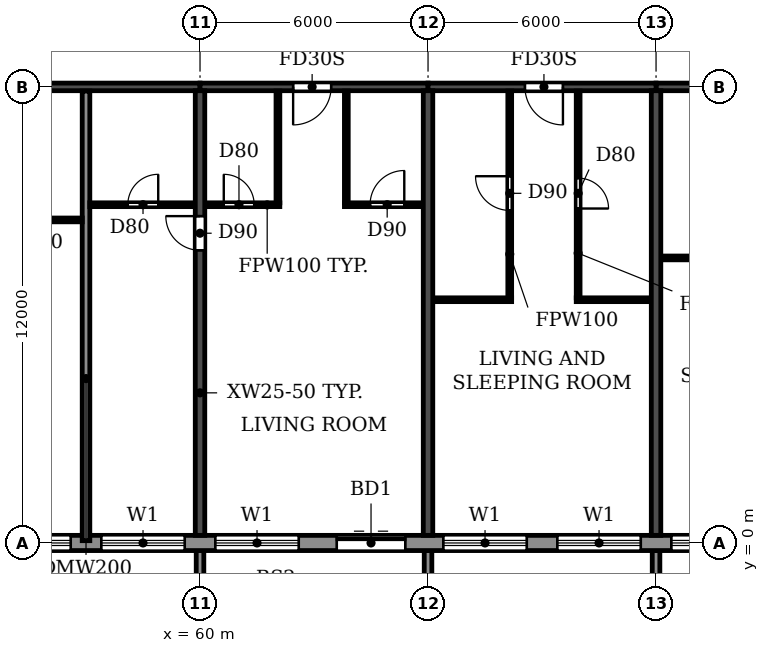
"""IFC4 building model, lengths in metres.
Left out: names, types, materials, properties, quantities, classifications, styles, units other than length and angle.
Written with IfcOpenShell. Run it as: python <this file> out.ifc"""

import sys

from ifc_helpers import new_model, si_unit, direction, frame, frame_2d, origin, place, context, subcontext, project, spatial, polyline, rectangle, outline, extrude, source, transform, mapped, element, fill, save


model = new_model("IFC4")
c1 = context("Model", 3, precision=1e-05, world=origin(), true_north=direction((0.0, 1.0)))
c2 = subcontext(c1, "Body", "Model", "MODEL_VIEW")
j1 = project(units=[si_unit("LENGTHUNIT", "METRE"), si_unit("PLANEANGLEUNIT", "RADIAN")], contexts=[c1])
p1 = place(None, origin())
s1 = spatial("IfcSite", under=j1, at=p1, CompositionType="ELEMENT")
p2 = place(p1, origin())
s2 = spatial("IfcBuilding", under=s1, at=p2, CompositionType="ELEMENT")
p3 = place(p2, frame((0.0, 0.0, 175.2)))
s3 = spatial("IfcBuildingStorey", under=s2, at=p3, CompositionType="ELEMENT", Elevation=175.2)
p4 = place(p3, frame((60.0, 0.2, 0.0), z_axis=(0.0, 0.0, 1.0), x_axis=(0.0, 1.0, 0.0)))
e1 = element("IfcWall", 1, at=p4, inside=s3, PredefinedType="SHEAR", context=c2, shape_type="SweptSolid", body=[
    extrude(rectangle(XDim=11.7, YDim=0.25, at=frame_2d((5.85, 0.0))), origin(), (0.0, 0.0, 1.0), 3.08),
])
p5 = place(p4, frame((7.5, 0.0, 0.0)))
e2 = element("IfcOpeningElement", 2, at=p5, cuts=e1, PredefinedType="OPENING", context=c2, shape_type="SweptSolid", body=[
    extrude(rectangle(XDim=0.9, YDim=2.1, at=frame_2d((0.45, 1.05))), frame((0.0, 0.135, 0.0), z_axis=(0.0, -1.0, 0.0), x_axis=(1.0, 0.0, 0.0)), (0.0, 0.0, 1.0), 0.27),
])
for number, where, z_axis, x_axis in (
    (3, (66.0, 0.2, 0.0), (0.0, 0.0, 1.0), (0.0, 1.0, 0.0)),
    (4, (72.0, 0.2, 0.0), (0.0, 0.0, 1.0), (0.0, 1.0, 0.0)),
):
    element("IfcWall", number, at=place(p3, frame(where, z_axis=z_axis, x_axis=x_axis)), inside=s3, PredefinedType="SHEAR", context=c2, shape_type="SweptSolid", body=[
        extrude(rectangle(XDim=11.7, YDim=0.25, at=frame_2d((5.85, 0.0))), origin(), (0.0, 0.0, 1.0), 3.08),
    ])
p6 = place(p3, frame((54.0, 12.0, 0.0), z_axis=(0.0, 0.0, 1.0), x_axis=(1.0, 0.0, 0.0)))
e5 = element("IfcWall", 5, at=p6, inside=s3, PredefinedType="SHEAR", context=c2, shape_type="SweptSolid", body=[
    extrude(rectangle(XDim=6.0, YDim=0.2, at=frame_2d((3.0, 0.0))), origin(), (0.0, 0.0, 1.0), 2.48),
])
p7 = place(p3, frame((60.0, 12.0, 0.0), z_axis=(0.0, 0.0, 1.0), x_axis=(1.0, 0.0, 0.0)))
e6 = element("IfcWall", 6, at=p7, inside=s3, PredefinedType="SHEAR", context=c2, shape_type="SweptSolid", body=[
    extrude(rectangle(XDim=6.0, YDim=0.2, at=frame_2d((3.0, 0.0))), origin(), (0.0, 0.0, 1.0), 2.48),
])
p8 = place(p7, frame((2.45, 0.0, 0.0)))
e7 = element("IfcOpeningElement", 7, at=p8, cuts=e6, PredefinedType="OPENING", context=c2, shape_type="SweptSolid", body=[
    extrude(rectangle(XDim=1.0, YDim=2.1, at=frame_2d((0.5, 1.05))), frame((0.0, 0.11, 0.0), z_axis=(0.0, -1.0, 0.0), x_axis=(1.0, 0.0, 0.0)), (0.0, 0.0, 1.0), 0.22),
])
p9 = place(p3, frame((66.0, 12.0, 0.0), z_axis=(0.0, 0.0, 1.0), x_axis=(1.0, 0.0, 0.0)))
e8 = element("IfcWall", 8, at=p9, inside=s3, PredefinedType="SHEAR", context=c2, shape_type="SweptSolid", body=[
    extrude(rectangle(XDim=6.0, YDim=0.2, at=frame_2d((3.0, 0.0))), origin(), (0.0, 0.0, 1.0), 2.48),
])
p10 = place(p9, frame((2.55, 0.0, 0.0)))
e9 = element("IfcOpeningElement", 9, at=p10, cuts=e8, PredefinedType="OPENING", context=c2, shape_type="SweptSolid", body=[
    extrude(rectangle(XDim=1.0, YDim=2.1, at=frame_2d((0.5, 1.05))), frame((0.0, 0.11, 0.0), z_axis=(0.0, -1.0, 0.0), x_axis=(1.0, 0.0, 0.0)), (0.0, 0.0, 1.0), 0.22),
])
p11 = place(p3, frame((72.0, 12.0, 0.0), z_axis=(0.0, 0.0, 1.0), x_axis=(1.0, 0.0, 0.0)))
e10 = element("IfcWall", 10, at=p11, inside=s3, PredefinedType="SHEAR", context=c2, shape_type="SweptSolid", body=[
    extrude(rectangle(XDim=6.0, YDim=0.2, at=frame_2d((3.0, 0.0))), origin(), (0.0, 0.0, 1.0), 2.48),
])
p12 = place(p11, frame((2.45, 0.0, 0.0)))
e11 = element("IfcOpeningElement", 11, at=p12, cuts=e10, PredefinedType="OPENING", context=c2, shape_type="SweptSolid", body=[
    extrude(rectangle(XDim=1.0, YDim=2.1, at=frame_2d((0.5, 1.05))), frame((0.0, 0.11, 0.0), z_axis=(0.0, -1.0, 0.0), x_axis=(1.0, 0.0, 0.0)), (0.0, 0.0, 1.0), 0.22),
])
p13 = place(p3, frame((22.683, 0.0, 0.0), z_axis=(0.0, 0.0, 1.0), x_axis=(1.0, 0.0, 0.0)))
e12 = element("IfcWall", 12, at=p13, inside=s3, PredefinedType="STANDARD", context=c2, shape_type="SweptSolid", body=[
    extrude(rectangle(XDim=56.634, YDim=0.4, at=frame_2d((28.317, 0.0))), origin(), (0.0, 0.0, 1.0), 3.08),
])
p14 = place(p13, frame((1.717, 0.0, 0.9)))
e13 = element("IfcOpeningElement", 13, at=p14, cuts=e12, PredefinedType="OPENING", context=c2, shape_type="SweptSolid", body=[
    extrude(rectangle(XDim=2.2, YDim=1.5, at=frame_2d((1.1, 0.75))), frame((0.0, 0.21, 0.0), z_axis=(0.0, -1.0, 0.0), x_axis=(1.0, 0.0, 0.0)), (0.0, 0.0, 1.0), 0.42),
])
p15 = place(p13, frame((4.917, 0.0, 0.0)))
e14 = element("IfcOpeningElement", 14, at=p15, cuts=e12, PredefinedType="OPENING", context=c2, shape_type="SweptSolid", body=[
    extrude(rectangle(XDim=1.8, YDim=2.4, at=frame_2d((0.9, 1.2))), frame((0.0, 0.21, 0.0), z_axis=(0.0, -1.0, 0.0), x_axis=(1.0, 0.0, 0.0)), (0.0, 0.0, 1.0), 0.42),
])
p16 = place(p13, frame((7.717, 0.0, 0.9)))
e15 = element("IfcOpeningElement", 15, at=p16, cuts=e12, PredefinedType="OPENING", context=c2, shape_type="SweptSolid", body=[
    extrude(rectangle(XDim=2.2, YDim=1.5, at=frame_2d((1.1, 0.75))), frame((0.0, 0.21, 0.0), z_axis=(0.0, -1.0, 0.0), x_axis=(1.0, 0.0, 0.0)), (0.0, 0.0, 1.0), 0.42),
])
p17 = place(p13, frame((10.717, 0.0, 0.9)))
e16 = element("IfcOpeningElement", 16, at=p17, cuts=e12, PredefinedType="OPENING", context=c2, shape_type="SweptSolid", body=[
    extrude(rectangle(XDim=2.2, YDim=1.5, at=frame_2d((1.1, 0.75))), frame((0.0, 0.21, 0.0), z_axis=(0.0, -1.0, 0.0), x_axis=(1.0, 0.0, 0.0)), (0.0, 0.0, 1.0), 0.42),
])
p18 = place(p13, frame((13.717, 0.0, 0.9)))
e17 = element("IfcOpeningElement", 17, at=p18, cuts=e12, PredefinedType="OPENING", context=c2, shape_type="SweptSolid", body=[
    extrude(rectangle(XDim=2.2, YDim=1.5, at=frame_2d((1.1, 0.75))), frame((0.0, 0.21, 0.0), z_axis=(0.0, -1.0, 0.0), x_axis=(1.0, 0.0, 0.0)), (0.0, 0.0, 1.0), 0.42),
])
p19 = place(p13, frame((16.917, 0.0, 0.0)))
e18 = element("IfcOpeningElement", 18, at=p19, cuts=e12, PredefinedType="OPENING", context=c2, shape_type="SweptSolid", body=[
    extrude(rectangle(XDim=1.8, YDim=2.4, at=frame_2d((0.9, 1.2))), frame((0.0, 0.21, 0.0), z_axis=(0.0, -1.0, 0.0), x_axis=(1.0, 0.0, 0.0)), (0.0, 0.0, 1.0), 0.42),
])
p20 = place(p13, frame((19.717, 0.0, 0.9)))
e19 = element("IfcOpeningElement", 19, at=p20, cuts=e12, PredefinedType="OPENING", context=c2, shape_type="SweptSolid", body=[
    extrude(rectangle(XDim=2.2, YDim=1.5, at=frame_2d((1.1, 0.75))), frame((0.0, 0.21, 0.0), z_axis=(0.0, -1.0, 0.0), x_axis=(1.0, 0.0, 0.0)), (0.0, 0.0, 1.0), 0.42),
])
p21 = place(p13, frame((22.717, 0.0, 0.9)))
e20 = element("IfcOpeningElement", 20, at=p21, cuts=e12, PredefinedType="OPENING", context=c2, shape_type="SweptSolid", body=[
    extrude(rectangle(XDim=2.2, YDim=1.5, at=frame_2d((1.1, 0.75))), frame((0.0, 0.21, 0.0), z_axis=(0.0, -1.0, 0.0), x_axis=(1.0, 0.0, 0.0)), (0.0, 0.0, 1.0), 0.42),
])
p22 = place(p13, frame((25.917, 0.0, 0.0)))
e21 = element("IfcOpeningElement", 21, at=p22, cuts=e12, PredefinedType="OPENING", context=c2, shape_type="SweptSolid", body=[
    extrude(rectangle(XDim=1.8, YDim=2.4, at=frame_2d((0.9, 1.2))), frame((0.0, 0.21, 0.0), z_axis=(0.0, -1.0, 0.0), x_axis=(1.0, 0.0, 0.0)), (0.0, 0.0, 1.0), 0.42),
])
p23 = place(p13, frame((28.717, 0.0, 0.9)))
e22 = element("IfcOpeningElement", 22, at=p23, cuts=e12, PredefinedType="OPENING", context=c2, shape_type="SweptSolid", body=[
    extrude(rectangle(XDim=2.2, YDim=1.5, at=frame_2d((1.1, 0.75))), frame((0.0, 0.21, 0.0), z_axis=(0.0, -1.0, 0.0), x_axis=(1.0, 0.0, 0.0)), (0.0, 0.0, 1.0), 0.42),
])
p24 = place(p13, frame((31.717, 0.0, 0.9)))
e23 = element("IfcOpeningElement", 23, at=p24, cuts=e12, PredefinedType="OPENING", context=c2, shape_type="SweptSolid", body=[
    extrude(rectangle(XDim=2.2, YDim=1.5, at=frame_2d((1.1, 0.75))), frame((0.0, 0.21, 0.0), z_axis=(0.0, -1.0, 0.0), x_axis=(1.0, 0.0, 0.0)), (0.0, 0.0, 1.0), 0.42),
])
p25 = place(p13, frame((34.717, 0.0, 0.9)))
e24 = element("IfcOpeningElement", 24, at=p25, cuts=e12, PredefinedType="OPENING", context=c2, shape_type="SweptSolid", body=[
    extrude(rectangle(XDim=2.2, YDim=1.5, at=frame_2d((1.1, 0.75))), frame((0.0, 0.21, 0.0), z_axis=(0.0, -1.0, 0.0), x_axis=(1.0, 0.0, 0.0)), (0.0, 0.0, 1.0), 0.42),
])
p26 = place(p13, frame((37.717, 0.0, 0.9)))
e25 = element("IfcOpeningElement", 25, at=p26, cuts=e12, PredefinedType="OPENING", context=c2, shape_type="SweptSolid", body=[
    extrude(rectangle(XDim=2.2, YDim=1.5, at=frame_2d((1.1, 0.75))), frame((0.0, 0.21, 0.0), z_axis=(0.0, -1.0, 0.0), x_axis=(1.0, 0.0, 0.0)), (0.0, 0.0, 1.0), 0.42),
])
p27 = place(p13, frame((40.917, 0.0, 0.0)))
e26 = element("IfcOpeningElement", 26, at=p27, cuts=e12, PredefinedType="OPENING", context=c2, shape_type="SweptSolid", body=[
    extrude(rectangle(XDim=1.8, YDim=2.4, at=frame_2d((0.9, 1.2))), frame((0.0, 0.21, 0.0), z_axis=(0.0, -1.0, 0.0), x_axis=(1.0, 0.0, 0.0)), (0.0, 0.0, 1.0), 0.42),
])
p28 = place(p13, frame((43.717, 0.0, 0.9)))
e27 = element("IfcOpeningElement", 27, at=p28, cuts=e12, PredefinedType="OPENING", context=c2, shape_type="SweptSolid", body=[
    extrude(rectangle(XDim=2.2, YDim=1.5, at=frame_2d((1.1, 0.75))), frame((0.0, 0.21, 0.0), z_axis=(0.0, -1.0, 0.0), x_axis=(1.0, 0.0, 0.0)), (0.0, 0.0, 1.0), 0.42),
])
p29 = place(p13, frame((46.717, 0.0, 0.9)))
e28 = element("IfcOpeningElement", 28, at=p29, cuts=e12, PredefinedType="OPENING", context=c2, shape_type="SweptSolid", body=[
    extrude(rectangle(XDim=2.2, YDim=1.5, at=frame_2d((1.1, 0.75))), frame((0.0, 0.21, 0.0), z_axis=(0.0, -1.0, 0.0), x_axis=(1.0, 0.0, 0.0)), (0.0, 0.0, 1.0), 0.42),
])
p30 = place(p13, frame((49.717, 0.0, 0.9)))
e29 = element("IfcOpeningElement", 29, at=p30, cuts=e12, PredefinedType="OPENING", context=c2, shape_type="SweptSolid", body=[
    extrude(rectangle(XDim=2.2, YDim=1.5, at=frame_2d((1.1, 0.75))), frame((0.0, 0.21, 0.0), z_axis=(0.0, -1.0, 0.0), x_axis=(1.0, 0.0, 0.0)), (0.0, 0.0, 1.0), 0.42),
])
p31 = place(p13, frame((52.917, 0.0, 0.0)))
e30 = element("IfcOpeningElement", 30, at=p31, cuts=e12, PredefinedType="OPENING", context=c2, shape_type="SweptSolid", body=[
    extrude(rectangle(XDim=1.8, YDim=2.4, at=frame_2d((0.9, 1.2))), frame((0.0, 0.21, 0.0), z_axis=(0.0, -1.0, 0.0), x_axis=(1.0, 0.0, 0.0)), (0.0, 0.0, 1.0), 0.42),
])
m1 = source(origin(), c2, "Body", "SweptSolid", [
    extrude(outline(polyline([(0.0, 0.0), (0.2, 0.0), (0.2, 1.65), (0.0, 1.65), (0.0, 0.0)])), origin(), (0.0, 0.0, 1.0), 3.1),
])
for number, where in (
    (31, (59.9, -1.85, 0.0)),
    (32, (65.9, -1.85, 0.0)),
    (33, (71.9, -1.85, 0.0)),
):
    element("IfcWall", number, at=place(p3, frame(where)), inside=s3, PredefinedType="STANDARD", context=c2, shape_type="MappedRepresentation", body=[
        mapped(m1, transform((0.0, 0.0, 0.0))),
    ])
p32 = place(p3, frame((57.0, 0.06, 0.0), z_axis=(0.0, 0.0, 1.0), x_axis=(0.0, 1.0, 0.0)))
e34 = element("IfcWall", 34, at=p32, inside=s3, PredefinedType="PARTITIONING", context=c2, shape_type="SweptSolid", body=[
    extrude(rectangle(XDim=11.83, YDim=0.2, at=frame_2d((5.915, 0.0))), origin(), (0.0, 0.0, 1.0), 3.08),
])
p33 = place(p3, frame((66.135, 6.4, 0.0), z_axis=(0.0, 0.0, 1.0), x_axis=(1.0, 0.0, 0.0)))
e35 = element("IfcWall", 35, at=p33, inside=s3, PredefinedType="PARTITIONING", context=c2, shape_type="SweptSolid", body=[
    extrude(rectangle(XDim=2.065, YDim=0.1, at=frame_2d((1.032, 0.0))), origin(), (0.0, 0.0, 1.0), 3.08),
])
for number, where, z_axis, x_axis in (
    (36, (69.9, 6.4, 0.0), (0.0, 0.0, 1.0), (1.0, 0.0, 0.0)),
    (37, (72.135, 7.5, 0.0), (0.0, 0.0, 1.0), (1.0, 0.0, 0.0)),
):
    element("IfcWall", number, at=place(p3, frame(where, z_axis=z_axis, x_axis=x_axis)), inside=s3, PredefinedType="PARTITIONING", context=c2, shape_type="SweptSolid", body=[
        extrude(rectangle(XDim=1.965, YDim=0.1, at=frame_2d((0.982, 0.0))), origin(), (0.0, 0.0, 1.0), 3.08),
    ])
p34 = place(p3, frame((54.135, 8.5, 0.0), z_axis=(0.0, 0.0, 1.0), x_axis=(1.0, 0.0, 0.0)))
e38 = element("IfcWall", 38, at=p34, inside=s3, PredefinedType="PARTITIONING", context=c2, shape_type="SweptSolid", body=[
    extrude(rectangle(XDim=2.765, YDim=0.1, at=frame_2d((1.382, 0.0))), origin(), (0.0, 0.0, 1.0), 3.08),
])
p35 = place(p34, frame((0.965, 0.0, 0.0)))
e39 = element("IfcOpeningElement", 39, at=p35, cuts=e38, PredefinedType="OPENING", context=c2, shape_type="SweptSolid", body=[
    extrude(rectangle(XDim=0.8, YDim=2.1, at=frame_2d((0.4, 1.05))), frame((0.0, 0.06, 0.0), z_axis=(0.0, -1.0, 0.0), x_axis=(1.0, 0.0, 0.0)), (0.0, 0.0, 1.0), 0.12),
])
p36 = place(p3, frame((57.1, 8.9, 0.0), z_axis=(0.0, 0.0, 1.0), x_axis=(1.0, 0.0, 0.0)))
e40 = element("IfcWall", 40, at=p36, inside=s3, PredefinedType="PARTITIONING", context=c2, shape_type="SweptSolid", body=[
    extrude(rectangle(XDim=2.765, YDim=0.1, at=frame_2d((1.382, 0.0))), origin(), (0.0, 0.0, 1.0), 3.08),
])
p37 = place(p36, frame((1.0, 0.0, 0.0)))
e41 = element("IfcOpeningElement", 41, at=p37, cuts=e40, PredefinedType="OPENING", context=c2, shape_type="SweptSolid", body=[
    extrude(rectangle(XDim=0.8, YDim=2.1, at=frame_2d((0.4, 1.05))), frame((0.0, 0.06, 0.0), z_axis=(0.0, -1.0, 0.0), x_axis=(1.0, 0.0, 0.0)), (0.0, 0.0, 1.0), 0.12),
])
p38 = place(p3, frame((60.135, 8.9, 0.0), z_axis=(0.0, 0.0, 1.0), x_axis=(1.0, 0.0, 0.0)))
e42 = element("IfcWall", 42, at=p38, inside=s3, PredefinedType="PARTITIONING", context=c2, shape_type="SweptSolid", body=[
    extrude(rectangle(XDim=1.965, YDim=0.1, at=frame_2d((0.982, 0.0))), origin(), (0.0, 0.0, 1.0), 3.08),
])
p39 = place(p38, frame((0.49, 0.0, 0.0)))
e43 = element("IfcOpeningElement", 43, at=p39, cuts=e42, PredefinedType="OPENING", context=c2, shape_type="SweptSolid", body=[
    extrude(rectangle(XDim=0.8, YDim=2.1, at=frame_2d((0.4, 1.05))), frame((0.0, 0.06, 0.0), z_axis=(0.0, -1.0, 0.0), x_axis=(1.0, 0.0, 0.0)), (0.0, 0.0, 1.0), 0.12),
])
p40 = place(p3, frame((63.8, 8.9, 0.0), z_axis=(0.0, 0.0, 1.0), x_axis=(1.0, 0.0, 0.0)))
e44 = element("IfcWall", 44, at=p40, inside=s3, PredefinedType="PARTITIONING", context=c2, shape_type="SweptSolid", body=[
    extrude(rectangle(XDim=2.065, YDim=0.1, at=frame_2d((1.032, 0.0))), origin(), (0.0, 0.0, 1.0), 3.08),
])
p41 = place(p40, frame((0.675, 0.0, 0.0)))
e45 = element("IfcOpeningElement", 45, at=p41, cuts=e44, PredefinedType="OPENING", context=c2, shape_type="SweptSolid", body=[
    extrude(rectangle(XDim=0.9, YDim=2.1, at=frame_2d((0.45, 1.05))), frame((0.0, 0.06, 0.0), z_axis=(0.0, -1.0, 0.0), x_axis=(1.0, 0.0, 0.0)), (0.0, 0.0, 1.0), 0.12),
])
for number, where, z_axis, x_axis in (
    (46, (62.05, 8.95, 0.0), (0.0, 0.0, 1.0), (0.0, 1.0, 0.0)),
    (47, (63.85, 8.95, 0.0), (0.0, 0.0, 1.0), (0.0, 1.0, 0.0)),
):
    element("IfcWall", number, at=place(p3, frame(where, z_axis=z_axis, x_axis=x_axis)), inside=s3, PredefinedType="PARTITIONING", context=c2, shape_type="SweptSolid", body=[
        extrude(rectangle(XDim=2.94, YDim=0.1, at=frame_2d((1.47, 0.0))), origin(), (0.0, 0.0, 1.0), 3.08),
    ])
p42 = place(p3, frame((68.15, 6.45, 0.0), z_axis=(0.0, 0.0, 1.0), x_axis=(0.0, 1.0, 0.0)))
e48 = element("IfcWall", 48, at=p42, inside=s3, PredefinedType="PARTITIONING", context=c2, shape_type="SweptSolid", body=[
    extrude(rectangle(XDim=5.44, YDim=0.1, at=frame_2d((2.72, 0.0))), origin(), (0.0, 0.0, 1.0), 3.08),
])
p43 = place(p42, frame((2.3, 0.0, 0.0)))
e49 = element("IfcOpeningElement", 49, at=p43, cuts=e48, PredefinedType="OPENING", context=c2, shape_type="SweptSolid", body=[
    extrude(rectangle(XDim=0.9, YDim=2.1, at=frame_2d((0.45, 1.05))), frame((0.0, 0.06, 0.0), z_axis=(0.0, -1.0, 0.0), x_axis=(1.0, 0.0, 0.0)), (0.0, 0.0, 1.0), 0.12),
])
p44 = place(p3, frame((69.95, 6.45, 0.0), z_axis=(0.0, 0.0, 1.0), x_axis=(0.0, 1.0, 0.0)))
e50 = element("IfcWall", 50, at=p44, inside=s3, PredefinedType="PARTITIONING", context=c2, shape_type="SweptSolid", body=[
    extrude(rectangle(XDim=5.44, YDim=0.1, at=frame_2d((2.72, 0.0))), origin(), (0.0, 0.0, 1.0), 3.08),
])
p45 = place(p44, frame((2.35, 0.0, 0.0)))
e51 = element("IfcOpeningElement", 51, at=p45, cuts=e50, PredefinedType="OPENING", context=c2, shape_type="SweptSolid", body=[
    extrude(rectangle(XDim=0.8, YDim=2.1, at=frame_2d((0.4, 1.05))), frame((0.0, 0.06, 0.0), z_axis=(0.0, -1.0, 0.0), x_axis=(1.0, 0.0, 0.0)), (0.0, 0.0, 1.0), 0.12),
])
p46 = place(p24, origin())
e52 = element("IfcWindow", 52, at=p46, inside=s3, PartitioningType="DOUBLE_PANEL_HORIZONTAL", PredefinedType="WINDOW", context=c2, shape_type="SweptSolid", body=[
    extrude(rectangle(XDim=2.2, YDim=1.5, at=frame_2d((1.1, 0.75))), frame((0.0, 0.03, 0.0), z_axis=(0.0, -1.0, 0.0), x_axis=(1.0, 0.0, 0.0)), (0.0, 0.0, 1.0), 0.06),
])
fill(e23, e52)
p47 = place(p25, origin())
e53 = element("IfcWindow", 53, at=p47, inside=s3, PartitioningType="DOUBLE_PANEL_HORIZONTAL", PredefinedType="WINDOW", context=c2, shape_type="SweptSolid", body=[
    extrude(rectangle(XDim=2.2, YDim=1.5, at=frame_2d((1.1, 0.75))), frame((0.0, 0.03, 0.0), z_axis=(0.0, -1.0, 0.0), x_axis=(1.0, 0.0, 0.0)), (0.0, 0.0, 1.0), 0.06),
])
fill(e24, e53)
p48 = place(p26, origin())
e54 = element("IfcWindow", 54, at=p48, inside=s3, PartitioningType="DOUBLE_PANEL_HORIZONTAL", PredefinedType="WINDOW", context=c2, shape_type="SweptSolid", body=[
    extrude(rectangle(XDim=2.2, YDim=1.5, at=frame_2d((1.1, 0.75))), frame((0.0, 0.03, 0.0), z_axis=(0.0, -1.0, 0.0), x_axis=(1.0, 0.0, 0.0)), (0.0, 0.0, 1.0), 0.06),
])
fill(e25, e54)
p49 = place(p27, origin())
e55 = element("IfcDoor", 55, at=p49, inside=s3, OperationType="DOUBLE_DOOR_SLIDING", PredefinedType="DOOR", context=c2, shape_type="SweptSolid", body=[
    extrude(rectangle(XDim=1.8, YDim=2.4, at=frame_2d((0.9, 1.2))), frame((0.0, 0.025, 0.0), z_axis=(0.0, -1.0, 0.0), x_axis=(1.0, 0.0, 0.0)), (0.0, 0.0, 1.0), 0.05),
])
fill(e26, e55)
p50 = place(p28, origin())
e56 = element("IfcWindow", 56, at=p50, inside=s3, PartitioningType="DOUBLE_PANEL_HORIZONTAL", PredefinedType="WINDOW", context=c2, shape_type="SweptSolid", body=[
    extrude(rectangle(XDim=2.2, YDim=1.5, at=frame_2d((1.1, 0.75))), frame((0.0, 0.03, 0.0), z_axis=(0.0, -1.0, 0.0), x_axis=(1.0, 0.0, 0.0)), (0.0, 0.0, 1.0), 0.06),
])
fill(e27, e56)
p51 = place(p29, origin())
e57 = element("IfcWindow", 57, at=p51, inside=s3, PartitioningType="DOUBLE_PANEL_HORIZONTAL", PredefinedType="WINDOW", context=c2, shape_type="SweptSolid", body=[
    extrude(rectangle(XDim=2.2, YDim=1.5, at=frame_2d((1.1, 0.75))), frame((0.0, 0.03, 0.0), z_axis=(0.0, -1.0, 0.0), x_axis=(1.0, 0.0, 0.0)), (0.0, 0.0, 1.0), 0.06),
])
fill(e28, e57)
p52 = place(p30, origin())
e58 = element("IfcWindow", 58, at=p52, inside=s3, PartitioningType="DOUBLE_PANEL_HORIZONTAL", PredefinedType="WINDOW", context=c2, shape_type="SweptSolid", body=[
    extrude(rectangle(XDim=2.2, YDim=1.5, at=frame_2d((1.1, 0.75))), frame((0.0, 0.03, 0.0), z_axis=(0.0, -1.0, 0.0), x_axis=(1.0, 0.0, 0.0)), (0.0, 0.0, 1.0), 0.06),
])
fill(e29, e58)
p53 = place(p37, origin())
e59 = element("IfcDoor", 59, at=p53, inside=s3, OperationType="SINGLE_SWING_RIGHT", PredefinedType="DOOR", context=c2, shape_type="SweptSolid", body=[
    extrude(rectangle(XDim=0.8, YDim=2.1, at=frame_2d((0.4, 1.05))), frame((0.0, 0.025, 0.0), z_axis=(0.0, -1.0, 0.0), x_axis=(1.0, 0.0, 0.0)), (0.0, 0.0, 1.0), 0.05),
])
fill(e41, e59)
p54 = place(p5, origin())
e60 = element("IfcDoor", 60, at=p54, inside=s3, OperationType="SINGLE_SWING_RIGHT", PredefinedType="DOOR", context=c2, shape_type="SweptSolid", body=[
    extrude(rectangle(XDim=0.9, YDim=2.1, at=frame_2d((0.45, 1.05))), frame((0.0, 0.025, 0.0), z_axis=(0.0, -1.0, 0.0), x_axis=(1.0, 0.0, 0.0)), (0.0, 0.0, 1.0), 0.05),
])
fill(e2, e60)
p55 = place(p39, origin())
e61 = element("IfcDoor", 61, at=p55, inside=s3, OperationType="SINGLE_SWING_LEFT", PredefinedType="DOOR", context=c2, shape_type="SweptSolid", body=[
    extrude(rectangle(XDim=0.8, YDim=2.1, at=frame_2d((0.4, 1.05))), frame((0.0, 0.025, 0.0), z_axis=(0.0, -1.0, 0.0), x_axis=(1.0, 0.0, 0.0)), (0.0, 0.0, 1.0), 0.05),
])
fill(e43, e61)
p56 = place(p8, frame((1.0, 0.0, 0.0), z_axis=(0.0, 0.0, 1.0), x_axis=(-1.0, 0.0, 0.0)))
e62 = element("IfcDoor", 62, at=p56, inside=s3, OperationType="SINGLE_SWING_RIGHT", PredefinedType="DOOR", context=c2, shape_type="SweptSolid", body=[
    extrude(rectangle(XDim=1.0, YDim=2.1, at=frame_2d((0.5, 1.05))), frame((0.0, 0.025, 0.0), z_axis=(0.0, -1.0, 0.0), x_axis=(1.0, 0.0, 0.0)), (0.0, 0.0, 1.0), 0.05),
])
fill(e7, e62)
p57 = place(p41, origin())
e63 = element("IfcDoor", 63, at=p57, inside=s3, OperationType="SINGLE_SWING_RIGHT", PredefinedType="DOOR", context=c2, shape_type="SweptSolid", body=[
    extrude(rectangle(XDim=0.9, YDim=2.1, at=frame_2d((0.45, 1.05))), frame((0.0, 0.025, 0.0), z_axis=(0.0, -1.0, 0.0), x_axis=(1.0, 0.0, 0.0)), (0.0, 0.0, 1.0), 0.05),
])
fill(e45, e63)
p58 = place(p43, origin())
e64 = element("IfcDoor", 64, at=p58, inside=s3, OperationType="SINGLE_SWING_RIGHT", PredefinedType="DOOR", context=c2, shape_type="SweptSolid", body=[
    extrude(rectangle(XDim=0.9, YDim=2.1, at=frame_2d((0.45, 1.05))), frame((0.0, 0.025, 0.0), z_axis=(0.0, -1.0, 0.0), x_axis=(1.0, 0.0, 0.0)), (0.0, 0.0, 1.0), 0.05),
])
fill(e49, e64)
p59 = place(p10, frame((1.0, 0.0, 0.0), z_axis=(0.0, 0.0, 1.0), x_axis=(-1.0, 0.0, 0.0)))
e65 = element("IfcDoor", 65, at=p59, inside=s3, OperationType="SINGLE_SWING_LEFT", PredefinedType="DOOR", context=c2, shape_type="SweptSolid", body=[
    extrude(rectangle(XDim=1.0, YDim=2.1, at=frame_2d((0.5, 1.05))), frame((0.0, 0.025, 0.0), z_axis=(0.0, -1.0, 0.0), x_axis=(1.0, 0.0, 0.0)), (0.0, 0.0, 1.0), 0.05),
])
fill(e9, e65)
p60 = place(p45, frame((0.8, 0.0, 0.0), z_axis=(0.0, 0.0, 1.0), x_axis=(-1.0, 0.0, 0.0)))
e66 = element("IfcDoor", 66, at=p60, inside=s3, OperationType="SINGLE_SWING_RIGHT", PredefinedType="DOOR", context=c2, shape_type="SweptSolid", body=[
    extrude(rectangle(XDim=0.8, YDim=2.1, at=frame_2d((0.4, 1.05))), frame((0.0, 0.025, 0.0), z_axis=(0.0, -1.0, 0.0), x_axis=(1.0, 0.0, 0.0)), (0.0, 0.0, 1.0), 0.05),
])
fill(e51, e66)
save(model, sys.argv[1])
